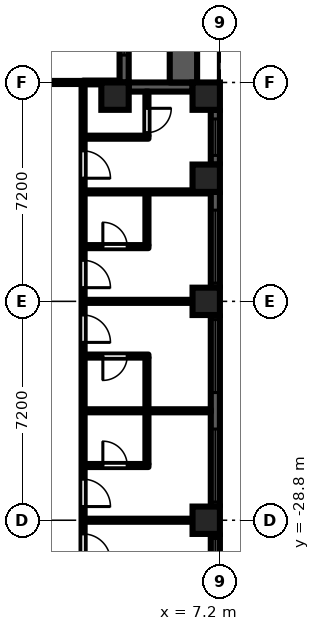
"""IFC4 building model, lengths in metres.
Left out: names, types, materials, properties, quantities, classifications, styles, units other than length and angle.
Written with IfcOpenShell. Run it as: python <this file> out.ifc"""

import sys

from ifc_helpers import new_model, si_unit, direction, frame, frame_2d, origin, origin_2d, place, context, subcontext, project, spatial, rectangle, extrude, element, fill, save


model = new_model("IFC4")
c1 = context("Model", 3, precision=1e-05, world=origin(), true_north=direction((0.0, 1.0)))
c2 = subcontext(c1, "Body", "Model", "MODEL_VIEW")
j1 = project(units=[si_unit("LENGTHUNIT", "METRE"), si_unit("PLANEANGLEUNIT", "RADIAN")], contexts=[c1])
p1 = place(None, origin())
s1 = spatial("IfcSite", under=j1, at=p1, CompositionType="ELEMENT")
p2 = place(p1, origin())
s2 = spatial("IfcBuilding", under=s1, at=p2, CompositionType="ELEMENT")
p3 = place(p2, frame((0.0, 0.0, 20.7)))
s3 = spatial("IfcBuildingStorey", under=s2, at=p3, CompositionType="ELEMENT", Elevation=20.7)
for number, where, z_axis, x_axis in (
    (1, (3.75, -14.85, 0.0), (0.0, 0.0, 1.0), (1.0, 0.0, 0.0)),
    (2, (6.75, -28.8, 0.0), (0.0, 0.0, 1.0), (1.0, 0.0, 0.0)),
    (3, (6.75, -21.6, 0.0), (0.0, 0.0, 1.0), (1.0, 0.0, 0.0)),
    (4, (6.75, -17.55, 0.0), (0.0, 0.0, 1.0), (1.0, 0.0, 0.0)),
    (5, (6.75, -14.85, 0.0), (0.0, 0.0, 1.0), (1.0, 0.0, 0.0)),
):
    element("IfcColumn", number, at=place(p3, frame(where, z_axis=z_axis, x_axis=x_axis)), inside=s3, PredefinedType="COLUMN", context=c2, shape_type="SweptSolid", body=[
        extrude(rectangle(XDim=0.9, YDim=0.9, at=origin_2d()), origin(), (0.0, 0.0, 1.0), 3.0),
    ])
p4 = place(p3, frame((7.05, -35.55, 0.0), z_axis=(0.0, 0.0, 1.0), x_axis=(0.0, 1.0, 0.0)))
e6 = element("IfcWall", 6, at=p4, inside=s3, PredefinedType="SOLIDWALL", context=c2, shape_type="SweptSolid", body=[
    extrude(rectangle(XDim=6.3, YDim=0.3, at=frame_2d((3.15, 0.0))), origin(), (0.0, 0.0, 1.0), 2.1),
])
p5 = place(p4, frame((3.75, 0.0, 0.2)))
e7 = element("IfcOpeningElement", 7, at=p5, cuts=e6, PredefinedType="OPENING", context=c2, shape_type="SweptSolid", body=[
    extrude(rectangle(XDim=2.4, YDim=1.85, at=frame_2d((1.2, 0.925))), frame((0.0, 0.16, 0.0), z_axis=(0.0, -1.0, 0.0), x_axis=(1.0, 0.0, 0.0)), (0.0, 0.0, 1.0), 0.32),
])
p6 = place(p3, frame((7.05, -28.35, 0.0), z_axis=(0.0, 0.0, 1.0), x_axis=(0.0, 1.0, 0.0)))
e8 = element("IfcWall", 8, at=p6, inside=s3, PredefinedType="SOLIDWALL", context=c2, shape_type="SweptSolid", body=[
    extrude(rectangle(XDim=6.3, YDim=0.3, at=frame_2d((3.15, 0.0))), origin(), (0.0, 0.0, 1.0), 2.1),
])
p7 = place(p6, frame((0.15, 0.0, 0.2)))
e9 = element("IfcOpeningElement", 9, at=p7, cuts=e8, PredefinedType="OPENING", context=c2, shape_type="SweptSolid", body=[
    extrude(rectangle(XDim=2.4, YDim=1.85, at=frame_2d((1.2, 0.925))), frame((0.0, 0.16, 0.0), z_axis=(0.0, -1.0, 0.0), x_axis=(1.0, 0.0, 0.0)), (0.0, 0.0, 1.0), 0.32),
])
p8 = place(p6, frame((3.75, 0.0, 0.2)))
e10 = element("IfcOpeningElement", 10, at=p8, cuts=e8, PredefinedType="OPENING", context=c2, shape_type="SweptSolid", body=[
    extrude(rectangle(XDim=2.4, YDim=1.85, at=frame_2d((1.2, 0.925))), frame((0.0, 0.16, 0.0), z_axis=(0.0, -1.0, 0.0), x_axis=(1.0, 0.0, 0.0)), (0.0, 0.0, 1.0), 0.32),
])
p9 = place(p3, frame((7.05, -21.15, 0.0), z_axis=(0.0, 0.0, 1.0), x_axis=(0.0, 1.0, 0.0)))
e11 = element("IfcWall", 11, at=p9, inside=s3, PredefinedType="SOLIDWALL", context=c2, shape_type="SweptSolid", body=[
    extrude(rectangle(XDim=3.15, YDim=0.3, at=frame_2d((1.575, 0.0))), origin(), (0.0, 0.0, 1.0), 2.1),
])
p10 = place(p9, frame((0.15, 0.0, 0.2)))
e12 = element("IfcOpeningElement", 12, at=p10, cuts=e11, PredefinedType="OPENING", context=c2, shape_type="SweptSolid", body=[
    extrude(rectangle(XDim=2.4, YDim=1.85, at=frame_2d((1.2, 0.925))), frame((0.0, 0.16, 0.0), z_axis=(0.0, -1.0, 0.0), x_axis=(1.0, 0.0, 0.0)), (0.0, 0.0, 1.0), 0.32),
])
p11 = place(p3, frame((7.05, -17.1, 0.0), z_axis=(0.0, 0.0, 1.0), x_axis=(0.0, 1.0, 0.0)))
e13 = element("IfcWall", 13, at=p11, inside=s3, PredefinedType="SOLIDWALL", context=c2, shape_type="SweptSolid", body=[
    extrude(rectangle(XDim=1.8, YDim=0.3, at=frame_2d((0.9, 0.0))), origin(), (0.0, 0.0, 1.0), 2.1),
])
p12 = place(p11, frame((0.3, 0.0, 0.2)))
e14 = element("IfcOpeningElement", 14, at=p12, cuts=e13, PredefinedType="OPENING", context=c2, shape_type="SweptSolid", body=[
    extrude(rectangle(XDim=1.2, YDim=1.85, at=frame_2d((0.6, 0.925))), frame((0.0, 0.16, 0.0), z_axis=(0.0, -1.0, 0.0), x_axis=(1.0, 0.0, 0.0)), (0.0, 0.0, 1.0), 0.32),
])
p13 = place(p3, frame((6.3, -14.55, 0.0), z_axis=(0.0, 0.0, 1.0), x_axis=(-1.0, 0.0, 0.0)))
e15 = element("IfcWall", 15, at=p13, inside=s3, PredefinedType="SOLIDWALL", context=c2, shape_type="SweptSolid", body=[
    extrude(rectangle(XDim=2.1, YDim=0.3, at=frame_2d((1.05, 0.0))), origin(), (0.0, 0.0, 1.0), 2.1),
])
p14 = place(p3, frame((4.05, -14.4, 0.0), z_axis=(0.0, 0.0, 1.0), x_axis=(0.0, 1.0, 0.0)))
e16 = element("IfcWall", 16, at=p14, inside=s3, PredefinedType="SOLIDWALL", context=c2, shape_type="SweptSolid", body=[
    extrude(rectangle(XDim=7.2, YDim=0.3, at=frame_2d((3.6, 0.0))), origin(), (0.0, 0.0, 1.0), 2.1),
])
p15 = place(p14, frame((3.0, 0.0, 0.0)))
e17 = element("IfcOpeningElement", 17, at=p15, cuts=e16, PredefinedType="OPENING", context=c2, shape_type="SweptSolid", body=[
    extrude(rectangle(XDim=1.2, YDim=2.05, at=frame_2d((0.6, 1.025))), frame((0.0, 0.16, 0.0), z_axis=(0.0, -1.0, 0.0), x_axis=(1.0, 0.0, 0.0)), (0.0, 0.0, 1.0), 0.32),
])
p16 = place(p14, frame((0.9, 0.0, 0.2)))
e18 = element("IfcOpeningElement", 18, at=p16, cuts=e16, PredefinedType="OPENING", context=c2, shape_type="SweptSolid", body=[
    extrude(rectangle(XDim=1.8, YDim=1.85, at=frame_2d((0.9, 0.925))), frame((0.0, 0.16, 0.0), z_axis=(0.0, -1.0, 0.0), x_axis=(1.0, 0.0, 0.0)), (0.0, 0.0, 1.0), 0.32),
])
p17 = place(p14, frame((4.5, 0.0, 0.2)))
e19 = element("IfcOpeningElement", 19, at=p17, cuts=e16, PredefinedType="OPENING", context=c2, shape_type="SweptSolid", body=[
    extrude(rectangle(XDim=1.8, YDim=1.85, at=frame_2d((0.9, 0.925))), frame((0.0, 0.16, 0.0), z_axis=(0.0, -1.0, 0.0), x_axis=(1.0, 0.0, 0.0)), (0.0, 0.0, 1.0), 0.32),
])
p18 = place(p3, frame((6.0, -14.4, 0.0), z_axis=(0.0, 0.0, 1.0), x_axis=(0.0, 1.0, 0.0)))
e20 = element("IfcWall", 20, at=p18, inside=s3, PredefinedType="PARAPET", context=c2, shape_type="SweptSolid", body=[
    extrude(rectangle(XDim=7.2, YDim=0.9, at=frame_2d((3.6, 0.0))), origin(), (0.0, 0.0, 1.0), 0.8),
])
p19 = place(p3, frame((1.275, -14.4, 0.0), z_axis=(0.0, 0.0, 1.0), x_axis=(1.0, 0.0, 0.0)))
e21 = element("IfcWall", 21, at=p19, inside=s3, PredefinedType="PARTITIONING", context=c2, shape_type="SweptSolid", body=[
    extrude(rectangle(XDim=1.425, YDim=0.1, at=frame_2d((0.712, 0.0))), origin(), (0.0, 0.0, 1.0), 2.575),
])
p20 = place(p3, frame((2.7, -32.35, 0.0), z_axis=(0.0, 0.0, 1.0), x_axis=(0.0, 1.0, 0.0)))
e22 = element("IfcWall", 22, at=p20, inside=s3, PredefinedType="PARTITIONING", context=c2, shape_type="SweptSolid", body=[
    extrude(rectangle(XDim=17.888, YDim=0.1, at=frame_2d((8.944, 0.0))), origin(), (0.0, 0.0, 1.0), 2.575),
])
p21 = place(p20, frame((2.2, 0.0, 0.0)))
e23 = element("IfcOpeningElement", 23, at=p21, cuts=e22, PredefinedType="OPENING", context=c2, shape_type="SweptSolid", body=[
    extrude(rectangle(XDim=0.9, YDim=2.1, at=frame_2d((0.45, 1.05))), frame((0.0, 0.06, 0.0), z_axis=(0.0, -1.0, 0.0), x_axis=(1.0, 0.0, 0.0)), (0.0, 0.0, 1.0), 0.12),
])
p22 = place(p20, frame((4.0, 0.0, 0.0)))
e24 = element("IfcOpeningElement", 24, at=p22, cuts=e22, PredefinedType="OPENING", context=c2, shape_type="SweptSolid", body=[
    extrude(rectangle(XDim=0.9, YDim=2.1, at=frame_2d((0.45, 1.05))), frame((0.0, 0.06, 0.0), z_axis=(0.0, -1.0, 0.0), x_axis=(1.0, 0.0, 0.0)), (0.0, 0.0, 1.0), 0.12),
])
p23 = place(p20, frame((9.4, 0.0, 0.0)))
e25 = element("IfcOpeningElement", 25, at=p23, cuts=e22, PredefinedType="OPENING", context=c2, shape_type="SweptSolid", body=[
    extrude(rectangle(XDim=0.9, YDim=2.1, at=frame_2d((0.45, 1.05))), frame((0.0, 0.06, 0.0), z_axis=(0.0, -1.0, 0.0), x_axis=(1.0, 0.0, 0.0)), (0.0, 0.0, 1.0), 0.12),
])
p24 = place(p20, frame((11.2, 0.0, 0.0)))
e26 = element("IfcOpeningElement", 26, at=p24, cuts=e22, PredefinedType="OPENING", context=c2, shape_type="SweptSolid", body=[
    extrude(rectangle(XDim=0.9, YDim=2.1, at=frame_2d((0.45, 1.05))), frame((0.0, 0.06, 0.0), z_axis=(0.0, -1.0, 0.0), x_axis=(1.0, 0.0, 0.0)), (0.0, 0.0, 1.0), 0.12),
])
p25 = place(p20, frame((14.8, 0.0, 0.0)))
e27 = element("IfcOpeningElement", 27, at=p25, cuts=e22, PredefinedType="OPENING", context=c2, shape_type="SweptSolid", body=[
    extrude(rectangle(XDim=0.9, YDim=2.1, at=frame_2d((0.45, 1.05))), frame((0.0, 0.06, 0.0), z_axis=(0.0, -1.0, 0.0), x_axis=(1.0, 0.0, 0.0)), (0.0, 0.0, 1.0), 0.12),
])
p26 = place(p3, frame((2.75, -28.8, 0.0), z_axis=(0.0, 0.0, 1.0), x_axis=(1.0, 0.0, 0.0)))
e28 = element("IfcWall", 28, at=p26, inside=s3, PredefinedType="PARTITIONING", context=c2, shape_type="SweptSolid", body=[
    extrude(rectangle(XDim=4.15, YDim=0.1, at=frame_2d((2.075, 0.0))), origin(), (0.0, 0.0, 1.0), 2.575),
])
p27 = place(p3, frame((2.75, -27.0, 0.0), z_axis=(0.0, 0.0, 1.0), x_axis=(1.0, 0.0, 0.0)))
e29 = element("IfcWall", 29, at=p27, inside=s3, PredefinedType="PARTITIONING", context=c2, shape_type="SweptSolid", body=[
    extrude(rectangle(XDim=2.1, YDim=0.1, at=frame_2d((1.05, 0.0))), origin(), (0.0, 0.0, 1.0), 2.575),
])
p28 = place(p27, frame((0.6, 0.0, 0.0)))
e30 = element("IfcOpeningElement", 30, at=p28, cuts=e29, PredefinedType="OPENING", context=c2, shape_type="SweptSolid", body=[
    extrude(rectangle(XDim=0.8, YDim=2.1, at=frame_2d((0.4, 1.05))), frame((0.0, 0.06, 0.0), z_axis=(0.0, -1.0, 0.0), x_axis=(1.0, 0.0, 0.0)), (0.0, 0.0, 1.0), 0.12),
])
p29 = place(p3, frame((2.75, -25.2, 0.0), z_axis=(0.0, 0.0, 1.0), x_axis=(1.0, 0.0, 0.0)))
e31 = element("IfcWall", 31, at=p29, inside=s3, PredefinedType="PARTITIONING", context=c2, shape_type="SweptSolid", body=[
    extrude(rectangle(XDim=4.15, YDim=0.1, at=frame_2d((2.075, 0.0))), origin(), (0.0, 0.0, 1.0), 2.575),
])
p30 = place(p3, frame((2.75, -23.4, 0.0), z_axis=(0.0, 0.0, 1.0), x_axis=(1.0, 0.0, 0.0)))
e32 = element("IfcWall", 32, at=p30, inside=s3, PredefinedType="PARTITIONING", context=c2, shape_type="SweptSolid", body=[
    extrude(rectangle(XDim=2.1, YDim=0.1, at=frame_2d((1.05, 0.0))), origin(), (0.0, 0.0, 1.0), 2.575),
])
p31 = place(p30, frame((0.6, 0.0, 0.0)))
e33 = element("IfcOpeningElement", 33, at=p31, cuts=e32, PredefinedType="OPENING", context=c2, shape_type="SweptSolid", body=[
    extrude(rectangle(XDim=0.8, YDim=2.1, at=frame_2d((0.4, 1.05))), frame((0.0, 0.06, 0.0), z_axis=(0.0, -1.0, 0.0), x_axis=(1.0, 0.0, 0.0)), (0.0, 0.0, 1.0), 0.12),
])
p32 = place(p3, frame((2.75, -21.6, 0.0), z_axis=(0.0, 0.0, 1.0), x_axis=(1.0, 0.0, 0.0)))
e34 = element("IfcWall", 34, at=p32, inside=s3, PredefinedType="PARTITIONING", context=c2, shape_type="SweptSolid", body=[
    extrude(rectangle(XDim=4.15, YDim=0.1, at=frame_2d((2.075, 0.0))), origin(), (0.0, 0.0, 1.0), 2.575),
])
p33 = place(p3, frame((2.75, -19.8, 0.0), z_axis=(0.0, 0.0, 1.0), x_axis=(1.0, 0.0, 0.0)))
e35 = element("IfcWall", 35, at=p33, inside=s3, PredefinedType="PARTITIONING", context=c2, shape_type="SweptSolid", body=[
    extrude(rectangle(XDim=2.1, YDim=0.1, at=frame_2d((1.05, 0.0))), origin(), (0.0, 0.0, 1.0), 2.575),
])
p34 = place(p33, frame((0.6, 0.0, 0.0)))
e36 = element("IfcOpeningElement", 36, at=p34, cuts=e35, PredefinedType="OPENING", context=c2, shape_type="SweptSolid", body=[
    extrude(rectangle(XDim=0.8, YDim=2.1, at=frame_2d((0.4, 1.05))), frame((0.0, 0.06, 0.0), z_axis=(0.0, -1.0, 0.0), x_axis=(1.0, 0.0, 0.0)), (0.0, 0.0, 1.0), 0.12),
])
p35 = place(p3, frame((2.75, -18.0, 0.0), z_axis=(0.0, 0.0, 1.0), x_axis=(1.0, 0.0, 0.0)))
e37 = element("IfcWall", 37, at=p35, inside=s3, PredefinedType="PARTITIONING", context=c2, shape_type="SweptSolid", body=[
    extrude(rectangle(XDim=4.15, YDim=0.1, at=frame_2d((2.075, 0.0))), origin(), (0.0, 0.0, 1.0), 2.575),
])
p36 = place(p3, frame((2.75, -16.2, 0.0), z_axis=(0.0, 0.0, 1.0), x_axis=(1.0, 0.0, 0.0)))
e38 = element("IfcWall", 38, at=p36, inside=s3, PredefinedType="PARTITIONING", context=c2, shape_type="SweptSolid", body=[
    extrude(rectangle(XDim=2.1, YDim=0.1, at=frame_2d((1.05, 0.0))), origin(), (0.0, 0.0, 1.0), 2.575),
])
p37 = place(p3, frame((2.7, -14.4, 0.0), z_axis=(0.0, 0.0, 1.0), x_axis=(1.0, 0.0, 0.0)))
e39 = element("IfcWall", 39, at=p37, inside=s3, PredefinedType="PARTITIONING", context=c2, shape_type="SweptSolid", body=[
    extrude(rectangle(XDim=1.2, YDim=0.125, at=frame_2d((0.6, 0.0))), origin(), (0.0, 0.0, 1.0), 2.575),
])
p38 = place(p3, frame((4.8, -26.95, 0.0), z_axis=(0.0, 0.0, 1.0), x_axis=(0.0, 1.0, 0.0)))
e40 = element("IfcWall", 40, at=p38, inside=s3, PredefinedType="PARTITIONING", context=c2, shape_type="SweptSolid", body=[
    extrude(rectangle(XDim=3.5, YDim=0.1, at=frame_2d((1.75, 0.0))), origin(), (0.0, 0.0, 1.0), 2.575),
])
p39 = place(p3, frame((4.8, -19.75, 0.0), z_axis=(0.0, 0.0, 1.0), x_axis=(0.0, 1.0, 0.0)))
e41 = element("IfcWall", 41, at=p39, inside=s3, PredefinedType="PARTITIONING", context=c2, shape_type="SweptSolid", body=[
    extrude(rectangle(XDim=1.7, YDim=0.1, at=frame_2d((0.85, 0.0))), origin(), (0.0, 0.0, 1.0), 2.575),
])
p40 = place(p3, frame((4.8, -16.15, 0.0), z_axis=(0.0, 0.0, 1.0), x_axis=(0.0, 1.0, 0.0)))
e42 = element("IfcWall", 42, at=p40, inside=s3, PredefinedType="PARTITIONING", context=c2, shape_type="SweptSolid", body=[
    extrude(rectangle(XDim=1.45, YDim=0.1, at=frame_2d((0.725, 0.0))), origin(), (0.0, 0.0, 1.0), 2.575),
])
p41 = place(p40, frame((0.1, 0.0, 0.0)))
e43 = element("IfcOpeningElement", 43, at=p41, cuts=e42, PredefinedType="OPENING", context=c2, shape_type="SweptSolid", body=[
    extrude(rectangle(XDim=0.8, YDim=2.1, at=frame_2d((0.4, 1.05))), frame((0.0, 0.06, 0.0), z_axis=(0.0, -1.0, 0.0), x_axis=(1.0, 0.0, 0.0)), (0.0, 0.0, 1.0), 0.12),
])
p42 = place(p5, origin())
e44 = element("IfcWindow", 44, at=p42, inside=s3, PartitioningType="SINGLE_PANEL", PredefinedType="WINDOW", context=c2, shape_type="SweptSolid", body=[
    extrude(rectangle(XDim=2.4, YDim=1.85, at=frame_2d((1.2, 0.925))), frame((0.0, 0.03, 0.0), z_axis=(0.0, -1.0, 0.0), x_axis=(1.0, 0.0, 0.0)), (0.0, 0.0, 1.0), 0.06),
])
fill(e7, e44)
p43 = place(p7, origin())
e45 = element("IfcWindow", 45, at=p43, inside=s3, PartitioningType="SINGLE_PANEL", PredefinedType="WINDOW", context=c2, shape_type="SweptSolid", body=[
    extrude(rectangle(XDim=2.4, YDim=1.85, at=frame_2d((1.2, 0.925))), frame((0.0, 0.03, 0.0), z_axis=(0.0, -1.0, 0.0), x_axis=(1.0, 0.0, 0.0)), (0.0, 0.0, 1.0), 0.06),
])
fill(e9, e45)
p44 = place(p8, origin())
e46 = element("IfcWindow", 46, at=p44, inside=s3, PartitioningType="SINGLE_PANEL", PredefinedType="WINDOW", context=c2, shape_type="SweptSolid", body=[
    extrude(rectangle(XDim=2.4, YDim=1.85, at=frame_2d((1.2, 0.925))), frame((0.0, 0.03, 0.0), z_axis=(0.0, -1.0, 0.0), x_axis=(1.0, 0.0, 0.0)), (0.0, 0.0, 1.0), 0.06),
])
fill(e10, e46)
p45 = place(p10, origin())
e47 = element("IfcWindow", 47, at=p45, inside=s3, PartitioningType="SINGLE_PANEL", PredefinedType="WINDOW", context=c2, shape_type="SweptSolid", body=[
    extrude(rectangle(XDim=2.4, YDim=1.85, at=frame_2d((1.2, 0.925))), frame((0.0, 0.03, 0.0), z_axis=(0.0, -1.0, 0.0), x_axis=(1.0, 0.0, 0.0)), (0.0, 0.0, 1.0), 0.06),
])
fill(e12, e47)
p46 = place(p12, origin())
e48 = element("IfcWindow", 48, at=p46, inside=s3, PartitioningType="SINGLE_PANEL", PredefinedType="WINDOW", context=c2, shape_type="SweptSolid", body=[
    extrude(rectangle(XDim=1.2, YDim=1.85, at=frame_2d((0.6, 0.925))), frame((0.0, 0.03, 0.0), z_axis=(0.0, -1.0, 0.0), x_axis=(1.0, 0.0, 0.0)), (0.0, 0.0, 1.0), 0.06),
])
fill(e14, e48)
p47 = place(p16, origin())
e49 = element("IfcWindow", 49, at=p47, inside=s3, PartitioningType="SINGLE_PANEL", PredefinedType="WINDOW", context=c2, shape_type="SweptSolid", body=[
    extrude(rectangle(XDim=1.8, YDim=1.85, at=frame_2d((0.9, 0.925))), frame((0.0, 0.03, 0.0), z_axis=(0.0, -1.0, 0.0), x_axis=(1.0, 0.0, 0.0)), (0.0, 0.0, 1.0), 0.06),
])
fill(e18, e49)
p48 = place(p21, frame((0.9, 0.0, 0.0), z_axis=(0.0, 0.0, 1.0), x_axis=(-1.0, 0.0, 0.0)))
e50 = element("IfcDoor", 50, at=p48, inside=s3, OperationType="SINGLE_SWING_RIGHT", PredefinedType="DOOR", context=c2, shape_type="SweptSolid", body=[
    extrude(rectangle(XDim=0.9, YDim=2.1, at=frame_2d((0.45, 1.05))), frame((0.0, 0.025, 0.0), z_axis=(0.0, -1.0, 0.0), x_axis=(1.0, 0.0, 0.0)), (0.0, 0.0, 1.0), 0.05),
])
fill(e23, e50)
p49 = place(p22, frame((0.9, 0.0, 0.0), z_axis=(0.0, 0.0, 1.0), x_axis=(-1.0, 0.0, 0.0)))
e51 = element("IfcDoor", 51, at=p49, inside=s3, OperationType="SINGLE_SWING_RIGHT", PredefinedType="DOOR", context=c2, shape_type="SweptSolid", body=[
    extrude(rectangle(XDim=0.9, YDim=2.1, at=frame_2d((0.45, 1.05))), frame((0.0, 0.025, 0.0), z_axis=(0.0, -1.0, 0.0), x_axis=(1.0, 0.0, 0.0)), (0.0, 0.0, 1.0), 0.05),
])
fill(e24, e51)
p50 = place(p23, frame((0.9, 0.0, 0.0), z_axis=(0.0, 0.0, 1.0), x_axis=(-1.0, 0.0, 0.0)))
e52 = element("IfcDoor", 52, at=p50, inside=s3, OperationType="SINGLE_SWING_RIGHT", PredefinedType="DOOR", context=c2, shape_type="SweptSolid", body=[
    extrude(rectangle(XDim=0.9, YDim=2.1, at=frame_2d((0.45, 1.05))), frame((0.0, 0.025, 0.0), z_axis=(0.0, -1.0, 0.0), x_axis=(1.0, 0.0, 0.0)), (0.0, 0.0, 1.0), 0.05),
])
fill(e25, e52)
p51 = place(p24, frame((0.9, 0.0, 0.0), z_axis=(0.0, 0.0, 1.0), x_axis=(-1.0, 0.0, 0.0)))
e53 = element("IfcDoor", 53, at=p51, inside=s3, OperationType="SINGLE_SWING_RIGHT", PredefinedType="DOOR", context=c2, shape_type="SweptSolid", body=[
    extrude(rectangle(XDim=0.9, YDim=2.1, at=frame_2d((0.45, 1.05))), frame((0.0, 0.025, 0.0), z_axis=(0.0, -1.0, 0.0), x_axis=(1.0, 0.0, 0.0)), (0.0, 0.0, 1.0), 0.05),
])
fill(e26, e53)
p52 = place(p25, frame((0.9, 0.0, 0.0), z_axis=(0.0, 0.0, 1.0), x_axis=(-1.0, 0.0, 0.0)))
e54 = element("IfcDoor", 54, at=p52, inside=s3, OperationType="SINGLE_SWING_RIGHT", PredefinedType="DOOR", context=c2, shape_type="SweptSolid", body=[
    extrude(rectangle(XDim=0.9, YDim=2.1, at=frame_2d((0.45, 1.05))), frame((0.0, 0.025, 0.0), z_axis=(0.0, -1.0, 0.0), x_axis=(1.0, 0.0, 0.0)), (0.0, 0.0, 1.0), 0.05),
])
fill(e27, e54)
p53 = place(p41, frame((0.8, 0.0, 0.0), z_axis=(0.0, 0.0, 1.0), x_axis=(-1.0, 0.0, 0.0)))
e55 = element("IfcDoor", 55, at=p53, inside=s3, OperationType="SINGLE_SWING_LEFT", PredefinedType="DOOR", context=c2, shape_type="SweptSolid", body=[
    extrude(rectangle(XDim=0.8, YDim=2.1, at=frame_2d((0.4, 1.05))), frame((0.0, 0.025, 0.0), z_axis=(0.0, -1.0, 0.0), x_axis=(1.0, 0.0, 0.0)), (0.0, 0.0, 1.0), 0.05),
])
fill(e43, e55)
p54 = place(p34, origin())
e56 = element("IfcDoor", 56, at=p54, inside=s3, OperationType="SINGLE_SWING_LEFT", PredefinedType="DOOR", context=c2, shape_type="SweptSolid", body=[
    extrude(rectangle(XDim=0.8, YDim=2.1, at=frame_2d((0.4, 1.05))), frame((0.0, 0.025, 0.0), z_axis=(0.0, -1.0, 0.0), x_axis=(1.0, 0.0, 0.0)), (0.0, 0.0, 1.0), 0.05),
])
fill(e36, e56)
p55 = place(p31, frame((0.8, 0.0, 0.0), z_axis=(0.0, 0.0, 1.0), x_axis=(-1.0, 0.0, 0.0)))
e57 = element("IfcDoor", 57, at=p55, inside=s3, OperationType="SINGLE_SWING_RIGHT", PredefinedType="DOOR", context=c2, shape_type="SweptSolid", body=[
    extrude(rectangle(XDim=0.8, YDim=2.1, at=frame_2d((0.4, 1.05))), frame((0.0, 0.025, 0.0), z_axis=(0.0, -1.0, 0.0), x_axis=(1.0, 0.0, 0.0)), (0.0, 0.0, 1.0), 0.05),
])
fill(e33, e57)
p56 = place(p28, origin())
e58 = element("IfcDoor", 58, at=p56, inside=s3, OperationType="SINGLE_SWING_LEFT", PredefinedType="DOOR", context=c2, shape_type="SweptSolid", body=[
    extrude(rectangle(XDim=0.8, YDim=2.1, at=frame_2d((0.4, 1.05))), frame((0.0, 0.025, 0.0), z_axis=(0.0, -1.0, 0.0), x_axis=(1.0, 0.0, 0.0)), (0.0, 0.0, 1.0), 0.05),
])
fill(e30, e58)
save(model, sys.argv[1])
